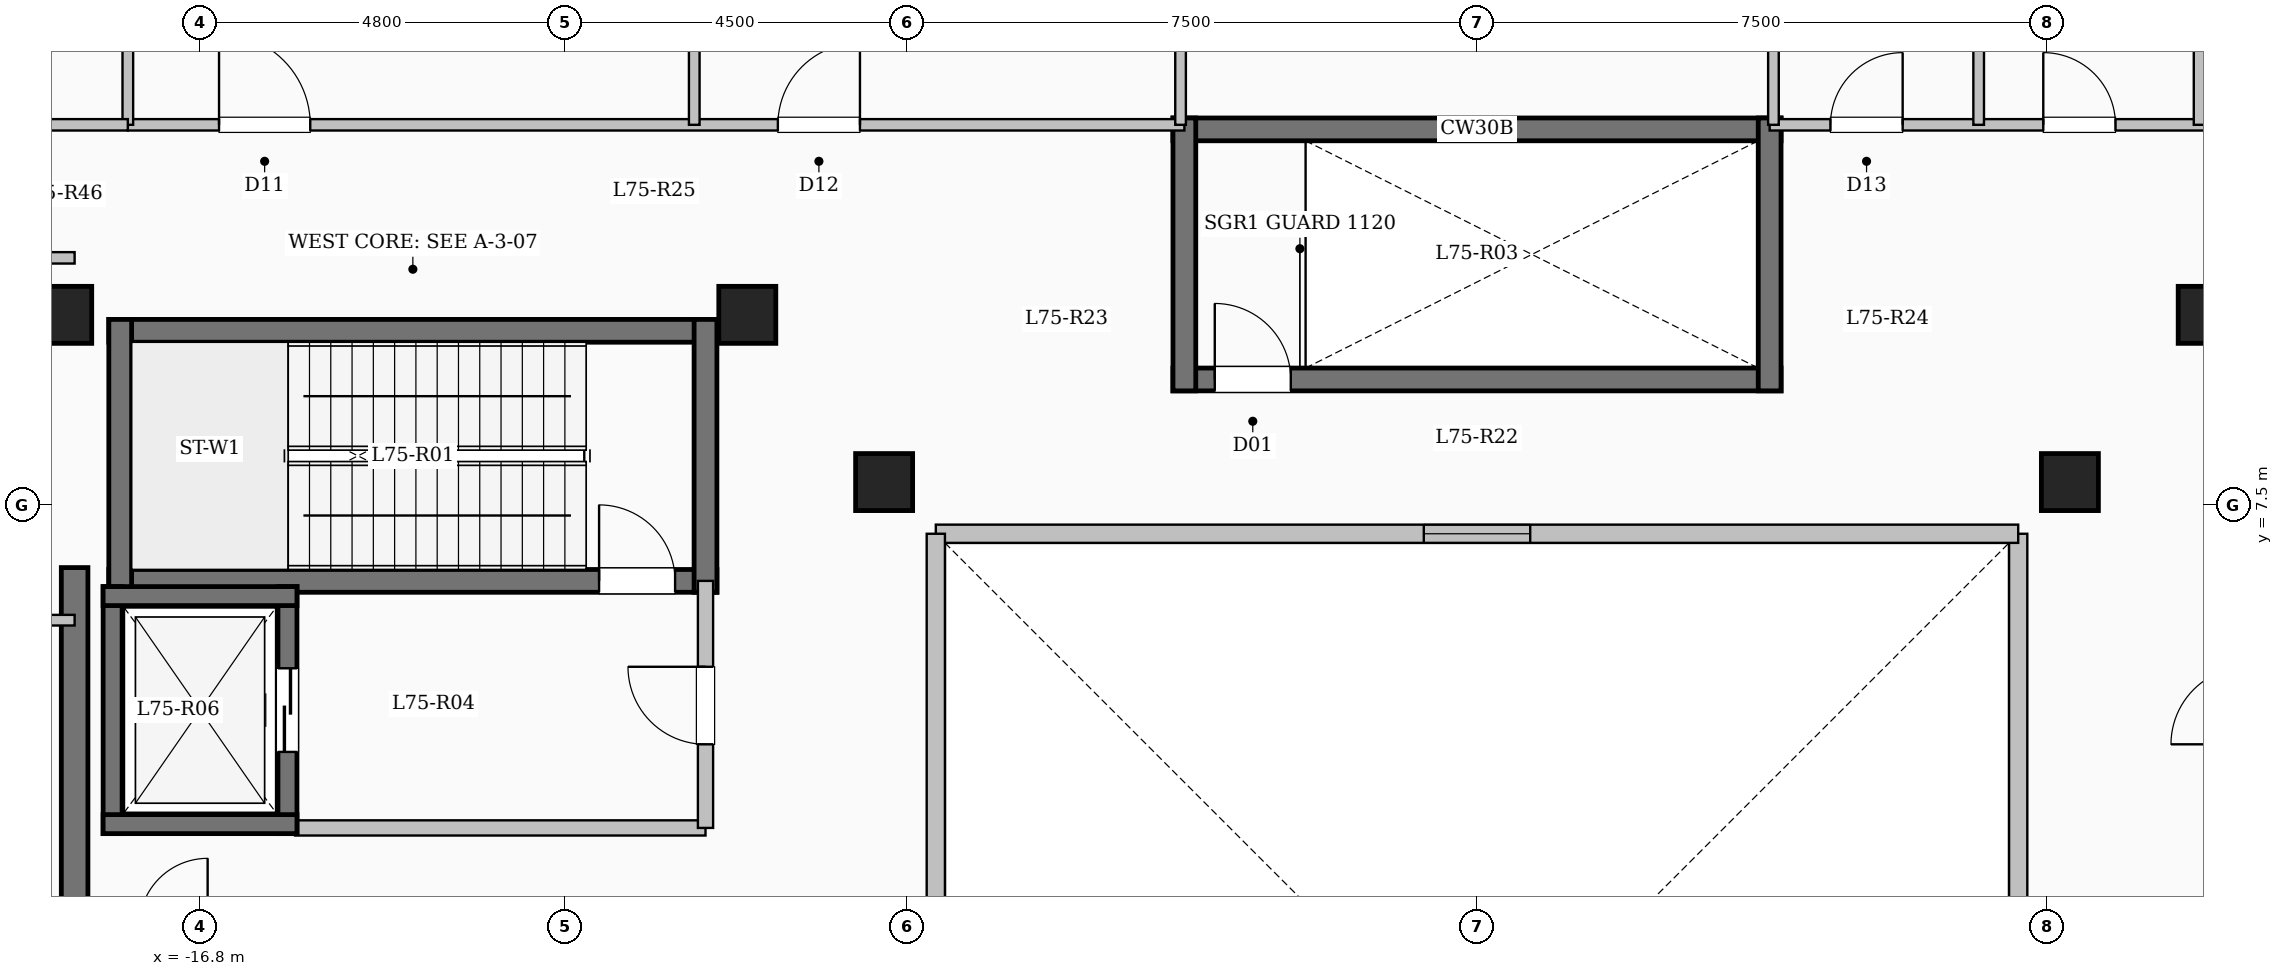
"""IFC4 building model, lengths in metres.
Left out: names, types, materials, properties, quantities, classifications, styles, units other than length and angle.
Written with IfcOpenShell. Run it as: python <this file> out.ifc"""

import sys

from ifc_helpers import new_model, si_unit, direction, frame, frame_2d, origin, origin_2d, place, context, subcontext, project, spatial, rectangle, extrude, element, fill, save


model = new_model("IFC4")
c1 = context("Model", 3, precision=1e-05, world=origin(), true_north=direction((0.0, 1.0)))
c2 = subcontext(c1, "Body", "Model", "MODEL_VIEW")
j1 = project(units=[si_unit("LENGTHUNIT", "METRE"), si_unit("PLANEANGLEUNIT", "RADIAN")], contexts=[c1])
p1 = place(None, origin())
s1 = spatial("IfcSite", under=j1, at=p1, CompositionType="ELEMENT")
p2 = place(p1, origin())
s2 = spatial("IfcBuilding", under=s1, at=p2, CompositionType="ELEMENT")
p3 = place(p2, frame((0.0, 0.0, 276.3)))
s3 = spatial("IfcBuildingStorey", under=s2, at=p3, CompositionType="ELEMENT", Elevation=276.3)
for number, where, z_axis, x_axis in (
    (1, (-7.8, 7.8, 0.0), (0.0, 0.0, 1.0), (1.0, 0.0, 0.0)),
    (2, (7.8, 7.8, 0.0), (0.0, 0.0, 1.0), (1.0, 0.0, 0.0)),
    (3, (-9.6, 10.0, 0.0), (0.0, 0.0, 1.0), (1.0, 0.0, 0.0)),
    (4, (9.6, 10.0, 0.0), (0.0, 0.0, 1.0), (1.0, 0.0, 0.0)),
    (5, (-18.6, 10.0, 0.0), (0.0, 0.0, 1.0), (1.0, 0.0, 0.0)),
):
    element("IfcColumn", number, at=place(p3, frame(where, z_axis=z_axis, x_axis=x_axis)), inside=s3, PredefinedType="COLUMN", context=c2, shape_type="SweptSolid", body=[
        extrude(rectangle(XDim=0.75, YDim=0.75, at=origin_2d()), origin(), (0.0, 0.0, 1.0), 5.25),
    ])
p4 = place(p3, frame((7.12, -7.12, 0.0), z_axis=(0.0, 0.0, 1.0), x_axis=(0.0, 1.0, 0.0)))
e6 = element("IfcWall", 6, at=p4, inside=s3, PredefinedType="SOLIDWALL", context=c2, shape_type="SweptSolid", body=[
    extrude(rectangle(XDim=14.24, YDim=0.24, at=frame_2d((7.12, 0.0))), origin(), (0.0, 0.0, 1.0), 4.95),
])
p5 = place(p4, frame((6.42, 0.0, 0.95)))
e7 = element("IfcOpeningElement", 7, at=p5, cuts=e6, PredefinedType="OPENING", context=c2, shape_type="SweptSolid", body=[
    extrude(rectangle(XDim=1.4, YDim=1.5, at=frame_2d((0.7, 0.75))), frame((0.0, 0.13, 0.0), z_axis=(0.0, -1.0, 0.0), x_axis=(1.0, 0.0, 0.0)), (0.0, 0.0, 1.0), 0.26),
])
p6 = place(p3, frame((7.12, 7.12, 0.0), z_axis=(0.0, 0.0, 1.0), x_axis=(-1.0, 0.0, 0.0)))
e8 = element("IfcWall", 8, at=p6, inside=s3, PredefinedType="SOLIDWALL", context=c2, shape_type="SweptSolid", body=[
    extrude(rectangle(XDim=14.24, YDim=0.24, at=frame_2d((7.12, 0.0))), origin(), (0.0, 0.0, 1.0), 4.95),
])
p7 = place(p6, frame((6.42, 0.0, 0.95)))
e9 = element("IfcOpeningElement", 9, at=p7, cuts=e8, PredefinedType="OPENING", context=c2, shape_type="SweptSolid", body=[
    extrude(rectangle(XDim=1.4, YDim=1.5, at=frame_2d((0.7, 0.75))), frame((0.0, 0.13, 0.0), z_axis=(0.0, -1.0, 0.0), x_axis=(1.0, 0.0, 0.0)), (0.0, 0.0, 1.0), 0.26),
])
p8 = place(p3, frame((-7.12, 7.12, 0.0), z_axis=(0.0, 0.0, 1.0), x_axis=(0.0, -1.0, 0.0)))
e10 = element("IfcWall", 10, at=p8, inside=s3, PredefinedType="SOLIDWALL", context=c2, shape_type="SweptSolid", body=[
    extrude(rectangle(XDim=14.24, YDim=0.24, at=frame_2d((7.12, 0.0))), origin(), (0.0, 0.0, 1.0), 4.95),
])
p9 = place(p8, frame((6.42, 0.0, 0.95)))
e11 = element("IfcOpeningElement", 11, at=p9, cuts=e10, PredefinedType="OPENING", context=c2, shape_type="SweptSolid", body=[
    extrude(rectangle(XDim=1.4, YDim=1.5, at=frame_2d((0.7, 0.75))), frame((0.0, 0.13, 0.0), z_axis=(0.0, -1.0, 0.0), x_axis=(1.0, 0.0, 0.0)), (0.0, 0.0, 1.0), 0.26),
])
p10 = place(p3, frame((-18.0, 9.79, 0.0), z_axis=(0.0, 0.0, 1.0), x_axis=(1.0, 0.0, 0.0)))
e12 = element("IfcWall", 12, at=p10, inside=s3, PredefinedType="SHEAR", context=c2, shape_type="SweptSolid", body=[
    extrude(rectangle(XDim=8.0, YDim=0.3, at=frame_2d((4.0, 0.0))), origin(), (0.0, 0.0, 1.0), 5.25),
])
p11 = place(p3, frame((-18.0, 6.5, 0.0), z_axis=(0.0, 0.0, 1.0), x_axis=(1.0, 0.0, 0.0)))
e13 = element("IfcWall", 13, at=p11, inside=s3, PredefinedType="SHEAR", context=c2, shape_type="SweptSolid", body=[
    extrude(rectangle(XDim=8.0, YDim=0.3, at=frame_2d((4.0, 0.0))), origin(), (0.0, 0.0, 1.0), 5.25),
])
p12 = place(p11, frame((6.45, 0.0, 0.0)))
e14 = element("IfcOpeningElement", 14, at=p12, cuts=e13, PredefinedType="OPENING", context=c2, shape_type="SweptSolid", body=[
    extrude(rectangle(XDim=1.0, YDim=2.15, at=frame_2d((0.5, 1.075))), frame((0.0, 0.16, 0.0), z_axis=(0.0, -1.0, 0.0), x_axis=(1.0, 0.0, 0.0)), (0.0, 0.0, 1.0), 0.32),
])
for number, where, z_axis, x_axis in (
    (15, (-17.85, 6.35, 0.0), (0.0, 0.0, 1.0), (0.0, 1.0, 0.0)),
    (16, (-10.15, 6.35, 0.0), (0.0, 0.0, 1.0), (0.0, 1.0, 0.0)),
):
    element("IfcWall", number, at=place(p3, frame(where, z_axis=z_axis, x_axis=x_axis)), inside=s3, PredefinedType="SHEAR", context=c2, shape_type="SweptSolid", body=[
        extrude(rectangle(XDim=3.59, YDim=0.3, at=frame_2d((1.795, 0.0))), origin(), (0.0, 0.0, 1.0), 5.25),
    ])
p13 = place(p3, frame((-4.0, 12.44, 0.0), z_axis=(0.0, 0.0, 1.0), x_axis=(1.0, 0.0, 0.0)))
e17 = element("IfcWall", 17, at=p13, inside=s3, PredefinedType="SHEAR", context=c2, shape_type="SweptSolid", body=[
    extrude(rectangle(XDim=8.0, YDim=0.3, at=frame_2d((4.0, 0.0))), origin(), (0.0, 0.0, 1.0), 5.25),
])
p14 = place(p3, frame((-4.0, 9.15, 0.0), z_axis=(0.0, 0.0, 1.0), x_axis=(1.0, 0.0, 0.0)))
e18 = element("IfcWall", 18, at=p14, inside=s3, PredefinedType="SHEAR", context=c2, shape_type="SweptSolid", body=[
    extrude(rectangle(XDim=8.0, YDim=0.3, at=frame_2d((4.0, 0.0))), origin(), (0.0, 0.0, 1.0), 5.25),
])
p15 = place(p14, frame((0.55, 0.0, 0.0)))
e19 = element("IfcOpeningElement", 19, at=p15, cuts=e18, PredefinedType="OPENING", context=c2, shape_type="SweptSolid", body=[
    extrude(rectangle(XDim=1.0, YDim=2.15, at=frame_2d((0.5, 1.075))), frame((0.0, 0.16, 0.0), z_axis=(0.0, -1.0, 0.0), x_axis=(1.0, 0.0, 0.0)), (0.0, 0.0, 1.0), 0.32),
])
for number, where, z_axis, x_axis in (
    (20, (-3.85, 9.0, 0.0), (0.0, 0.0, 1.0), (0.0, 1.0, 0.0)),
    (21, (3.85, 9.0, 0.0), (0.0, 0.0, 1.0), (0.0, 1.0, 0.0)),
):
    element("IfcWall", number, at=place(p3, frame(where, z_axis=z_axis, x_axis=x_axis)), inside=s3, PredefinedType="SHEAR", context=c2, shape_type="SweptSolid", body=[
        extrude(rectangle(XDim=3.59, YDim=0.3, at=frame_2d((1.795, 0.0))), origin(), (0.0, 0.0, 1.0), 5.25),
    ])
p16 = place(p3, frame((-15.55, 3.25, 0.0), z_axis=(0.0, 0.0, 1.0), x_axis=(1.0, 0.0, 0.0)))
e22 = element("IfcWall", 22, at=p16, inside=s3, PredefinedType="SOLIDWALL", context=c2, shape_type="SweptSolid", body=[
    extrude(rectangle(XDim=5.4, YDim=0.2, at=frame_2d((2.7, 0.0))), origin(), (0.0, 0.0, 1.0), 4.95),
])
p17 = place(p3, frame((-10.15, 3.25, 0.0), z_axis=(0.0, 0.0, 1.0), x_axis=(0.0, 1.0, 0.0)))
e23 = element("IfcWall", 23, at=p17, inside=s3, PredefinedType="SOLIDWALL", context=c2, shape_type="SweptSolid", body=[
    extrude(rectangle(XDim=3.25, YDim=0.2, at=frame_2d((1.625, 0.0))), origin(), (0.0, 0.0, 1.0), 4.95),
])
p18 = place(p17, frame((1.1, 0.0, 0.0)))
e24 = element("IfcOpeningElement", 24, at=p18, cuts=e23, PredefinedType="OPENING", context=c2, shape_type="SweptSolid", body=[
    extrude(rectangle(XDim=1.02, YDim=2.15, at=frame_2d((0.51, 1.075))), frame((0.0, 0.11, 0.0), z_axis=(0.0, -1.0, 0.0), x_axis=(1.0, 0.0, 0.0)), (0.0, 0.0, 1.0), 0.22),
])
p19 = place(p3, frame((-17.95, 3.175, 0.0), z_axis=(0.0, 0.0, 1.0), x_axis=(0.0, 1.0, 0.0)))
e25 = element("IfcWall", 25, at=p19, inside=s3, PredefinedType="SHEAR", context=c2, shape_type="SweptSolid", body=[
    extrude(rectangle(XDim=3.25, YDim=0.25, at=frame_2d((1.625, 0.0))), origin(), (0.0, 0.0, 1.0), 5.25),
])
p20 = place(p3, frame((-15.65, 3.175, 0.0), z_axis=(0.0, 0.0, 1.0), x_axis=(0.0, 1.0, 0.0)))
e26 = element("IfcWall", 26, at=p20, inside=s3, PredefinedType="SHEAR", context=c2, shape_type="SweptSolid", body=[
    extrude(rectangle(XDim=3.25, YDim=0.25, at=frame_2d((1.625, 0.0))), origin(), (0.0, 0.0, 1.0), 5.25),
])
p21 = place(p20, frame((1.075, 0.0, 0.0)))
e27 = element("IfcOpeningElement", 27, at=p21, cuts=e26, PredefinedType="OPENING", context=c2, shape_type="SweptSolid", body=[
    extrude(rectangle(XDim=1.1, YDim=2.15, at=frame_2d((0.55, 1.075))), frame((0.0, 0.135, 0.0), z_axis=(0.0, -1.0, 0.0), x_axis=(1.0, 0.0, 0.0)), (0.0, 0.0, 1.0), 0.27),
])
for number, where, z_axis, x_axis in (
    (28, (-18.075, 3.3, 0.0), (0.0, 0.0, 1.0), (1.0, 0.0, 0.0)),
    (29, (-18.075, 6.3, 0.0), (0.0, 0.0, 1.0), (1.0, 0.0, 0.0)),
):
    element("IfcWall", number, at=place(p3, frame(where, z_axis=z_axis, x_axis=x_axis)), inside=s3, PredefinedType="SHEAR", context=c2, shape_type="SweptSolid", body=[
        extrude(rectangle(XDim=2.55, YDim=0.25, at=frame_2d((1.275, 0.0))), origin(), (0.0, 0.0, 1.0), 5.25),
    ])
p22 = place(p3, frame((-18.45, -7.375, 0.0), z_axis=(0.0, 0.0, 1.0), x_axis=(0.0, 1.0, 0.0)))
e30 = element("IfcWall", 30, at=p22, inside=s3, PredefinedType="SHEAR", context=c2, shape_type="SweptSolid", body=[
    extrude(rectangle(XDim=14.05, YDim=0.35, at=frame_2d((7.025, 0.0))), origin(), (0.0, 0.0, 1.0), 5.25),
])
p23 = place(p3, frame((-17.75, 12.5, 0.0), z_axis=(0.0, 0.0, 1.0), x_axis=(1.0, 0.0, 0.0)))
e31 = element("IfcWall", 31, at=p23, inside=s3, PredefinedType="PARTITIONING", context=c2, shape_type="SweptSolid", body=[
    extrude(rectangle(XDim=13.9, YDim=0.15, at=frame_2d((6.95, 0.0))), origin(), (0.0, 0.0, 1.0), 4.95),
])
p24 = place(p23, frame((1.2, 0.0, 0.0)))
e32 = element("IfcOpeningElement", 32, at=p24, cuts=e31, PredefinedType="OPENING", context=c2, shape_type="SweptSolid", body=[
    extrude(rectangle(XDim=1.2, YDim=2.15, at=frame_2d((0.6, 1.075))), frame((0.0, 0.085, 0.0), z_axis=(0.0, -1.0, 0.0), x_axis=(1.0, 0.0, 0.0)), (0.0, 0.0, 1.0), 0.17),
])
p25 = place(p23, frame((8.552, 0.0, 0.0)))
e33 = element("IfcOpeningElement", 33, at=p25, cuts=e31, PredefinedType="OPENING", context=c2, shape_type="SweptSolid", body=[
    extrude(rectangle(XDim=1.08, YDim=2.15, at=frame_2d((0.54, 1.075))), frame((0.0, 0.085, 0.0), z_axis=(0.0, -1.0, 0.0), x_axis=(1.0, 0.0, 0.0)), (0.0, 0.0, 1.0), 0.17),
])
p26 = place(p3, frame((3.85, 12.5, 0.0), z_axis=(0.0, 0.0, 1.0), x_axis=(1.0, 0.0, 0.0)))
e34 = element("IfcWall", 34, at=p26, inside=s3, PredefinedType="PARTITIONING", context=c2, shape_type="SweptSolid", body=[
    extrude(rectangle(XDim=13.9, YDim=0.15, at=frame_2d((6.95, 0.0))), origin(), (0.0, 0.0, 1.0), 4.95),
])
p27 = place(p26, frame((0.8, 0.0, 0.0)))
e35 = element("IfcOpeningElement", 35, at=p27, cuts=e34, PredefinedType="OPENING", context=c2, shape_type="SweptSolid", body=[
    extrude(rectangle(XDim=0.95, YDim=2.15, at=frame_2d((0.475, 1.075))), frame((0.0, 0.085, 0.0), z_axis=(0.0, -1.0, 0.0), x_axis=(1.0, 0.0, 0.0)), (0.0, 0.0, 1.0), 0.17),
])
p28 = place(p26, frame((3.6, 0.0, 0.0)))
e36 = element("IfcOpeningElement", 36, at=p28, cuts=e34, PredefinedType="OPENING", context=c2, shape_type="SweptSolid", body=[
    extrude(rectangle(XDim=0.95, YDim=2.15, at=frame_2d((0.475, 1.075))), frame((0.0, 0.085, 0.0), z_axis=(0.0, -1.0, 0.0), x_axis=(1.0, 0.0, 0.0)), (0.0, 0.0, 1.0), 0.17),
])
p29 = place(p26, frame((6.55, 0.0, 0.0)))
e37 = element("IfcOpeningElement", 37, at=p29, cuts=e34, PredefinedType="OPENING", context=c2, shape_type="SweptSolid", body=[
    extrude(rectangle(XDim=1.08, YDim=2.15, at=frame_2d((0.54, 1.075))), frame((0.0, 0.085, 0.0), z_axis=(0.0, -1.0, 0.0), x_axis=(1.0, 0.0, 0.0)), (0.0, 0.0, 1.0), 0.17),
])
p30 = place(p26, frame((9.637, 0.0, 0.0)))
e38 = element("IfcOpeningElement", 38, at=p30, cuts=e34, PredefinedType="OPENING", context=c2, shape_type="SweptSolid", body=[
    extrude(rectangle(XDim=1.2, YDim=2.15, at=frame_2d((0.6, 1.075))), frame((0.0, 0.085, 0.0), z_axis=(0.0, -1.0, 0.0), x_axis=(1.0, 0.0, 0.0)), (0.0, 0.0, 1.0), 0.17),
])
p31 = place(p3, frame((-3.9, 12.5, 0.0), z_axis=(0.0, 0.0, 1.0), x_axis=(0.0, 1.0, 0.0)))
e39 = element("IfcWall", 39, at=p31, inside=s3, PredefinedType="PARTITIONING", context=c2, shape_type="SweptSolid", body=[
    extrude(rectangle(XDim=9.88, YDim=0.14, at=frame_2d((4.94, 0.0))), origin(), (0.0, 0.0, 1.0), 4.95),
])
p32 = place(p31, frame((1.1, 0.0, 0.0)))
e40 = element("IfcOpeningElement", 40, at=p32, cuts=e39, PredefinedType="OPENING", context=c2, shape_type="SweptSolid", body=[
    extrude(rectangle(XDim=1.08, YDim=2.15, at=frame_2d((0.54, 1.075))), frame((0.0, 0.08, 0.0), z_axis=(0.0, -1.0, 0.0), x_axis=(1.0, 0.0, 0.0)), (0.0, 0.0, 1.0), 0.16),
])
p33 = place(p3, frame((3.9, 12.5, 0.0), z_axis=(0.0, 0.0, 1.0), x_axis=(0.0, 1.0, 0.0)))
e41 = element("IfcWall", 41, at=p33, inside=s3, PredefinedType="PARTITIONING", context=c2, shape_type="SweptSolid", body=[
    extrude(rectangle(XDim=9.88, YDim=0.14, at=frame_2d((4.94, 0.0))), origin(), (0.0, 0.0, 1.0), 4.95),
])
p34 = place(p3, frame((-10.298, 12.5, 0.0), z_axis=(0.0, 0.0, 1.0), x_axis=(0.0, 1.0, 0.0)))
e42 = element("IfcWall", 42, at=p34, inside=s3, PredefinedType="PARTITIONING", context=c2, shape_type="SweptSolid", body=[
    extrude(rectangle(XDim=8.573, YDim=0.14, at=frame_2d((4.287, 0.0))), origin(), (0.0, 0.0, 1.0), 4.95),
])
p35 = place(p3, frame((6.6, 12.5, 0.0), z_axis=(0.0, 0.0, 1.0), x_axis=(0.0, 1.0, 0.0)))
e43 = element("IfcWall", 43, at=p35, inside=s3, PredefinedType="PARTITIONING", context=c2, shape_type="SweptSolid", body=[
    extrude(rectangle(XDim=9.485, YDim=0.14, at=frame_2d((4.743, 0.0))), origin(), (0.0, 0.0, 1.0), 4.95),
])
p36 = place(p3, frame((9.5, 12.5, 0.0), z_axis=(0.0, 0.0, 1.0), x_axis=(0.0, 1.0, 0.0)))
e44 = element("IfcWall", 44, at=p36, inside=s3, PredefinedType="PARTITIONING", context=c2, shape_type="SweptSolid", body=[
    extrude(rectangle(XDim=8.77, YDim=0.14, at=frame_2d((4.385, 0.0))), origin(), (0.0, 0.0, 1.0), 4.95),
])
p37 = place(p3, frame((-22.68, 10.75, 0.0), z_axis=(0.0, 0.0, 1.0), x_axis=(1.0, 0.0, 0.0)))
e45 = element("IfcWall", 45, at=p37, inside=s3, PredefinedType="PARTITIONING", context=c2, shape_type="SweptSolid", body=[
    extrude(rectangle(XDim=4.23, YDim=0.15, at=frame_2d((2.115, 0.0))), origin(), (0.0, 0.0, 1.0), 4.95),
])
p38 = place(p3, frame((-17.75, 12.5, 0.0), z_axis=(0.0, 0.0, 1.0), x_axis=(0.0, 1.0, 0.0)))
e46 = element("IfcWall", 46, at=p38, inside=s3, PredefinedType="PARTITIONING", context=c2, shape_type="SweptSolid", body=[
    extrude(rectangle(XDim=5.05, YDim=0.14, at=frame_2d((2.525, 0.0))), origin(), (0.0, 0.0, 1.0), 4.95),
])
p39 = place(p3, frame((-22.68, 12.5, 0.0), z_axis=(0.0, 0.0, 1.0), x_axis=(1.0, 0.0, 0.0)))
e47 = element("IfcWall", 47, at=p39, inside=s3, PredefinedType="PARTITIONING", context=c2, shape_type="SweptSolid", body=[
    extrude(rectangle(XDim=4.93, YDim=0.15, at=frame_2d((2.465, 0.0))), origin(), (0.0, 0.0, 1.0), 4.95),
])
p40 = place(p39, frame((1.99, 0.0, 0.0)))
e48 = element("IfcOpeningElement", 48, at=p40, cuts=e47, PredefinedType="OPENING", context=c2, shape_type="SweptSolid", body=[
    extrude(rectangle(XDim=0.95, YDim=2.15, at=frame_2d((0.475, 1.075))), frame((0.0, 0.085, 0.0), z_axis=(0.0, -1.0, 0.0), x_axis=(1.0, 0.0, 0.0)), (0.0, 0.0, 1.0), 0.17),
])
p41 = place(p3, frame((-22.68, 5.983, 0.0), z_axis=(0.0, 0.0, 1.0), x_axis=(1.0, 0.0, 0.0)))
e49 = element("IfcWall", 49, at=p41, inside=s3, PredefinedType="PARTITIONING", context=c2, shape_type="SweptSolid", body=[
    extrude(rectangle(XDim=4.23, YDim=0.14, at=frame_2d((2.115, 0.0))), origin(), (0.0, 0.0, 1.0), 4.535),
])
p42 = place(p41, frame((2.38, 0.0, 0.0)))
e50 = element("IfcOpeningElement", 50, at=p42, cuts=e49, PredefinedType="OPENING", context=c2, shape_type="SweptSolid", body=[
    extrude(rectangle(XDim=1.08, YDim=2.15, at=frame_2d((0.54, 1.075))), frame((0.0, 0.08, 0.0), z_axis=(0.0, -1.0, 0.0), x_axis=(1.0, 0.0, 0.0)), (0.0, 0.0, 1.0), 0.16),
])
p43 = place(p7, origin())
e51 = element("IfcWindow", 51, at=p43, inside=s3, PartitioningType="SINGLE_PANEL", PredefinedType="WINDOW", context=c2, shape_type="SweptSolid", body=[
    extrude(rectangle(XDim=1.4, YDim=1.5, at=frame_2d((0.7, 0.75))), frame((0.0, 0.03, 0.0), z_axis=(0.0, -1.0, 0.0), x_axis=(1.0, 0.0, 0.0)), (0.0, 0.0, 1.0), 0.06),
])
fill(e9, e51)
p44 = place(p12, origin())
e52 = element("IfcDoor", 52, at=p44, inside=s3, OperationType="SINGLE_SWING_LEFT", PredefinedType="DOOR", context=c2, shape_type="SweptSolid", body=[
    extrude(rectangle(XDim=1.0, YDim=2.15, at=frame_2d((0.5, 1.075))), frame((0.0, 0.025, 0.0), z_axis=(0.0, -1.0, 0.0), x_axis=(1.0, 0.0, 0.0)), (0.0, 0.0, 1.0), 0.05),
])
fill(e14, e52)
p45 = place(p15, origin())
e53 = element("IfcDoor", 53, at=p45, inside=s3, OperationType="SINGLE_SWING_LEFT", PredefinedType="DOOR", context=c2, shape_type="SweptSolid", body=[
    extrude(rectangle(XDim=1.0, YDim=2.15, at=frame_2d((0.5, 1.075))), frame((0.0, 0.025, 0.0), z_axis=(0.0, -1.0, 0.0), x_axis=(1.0, 0.0, 0.0)), (0.0, 0.0, 1.0), 0.05),
])
fill(e19, e53)
p46 = place(p18, origin())
e54 = element("IfcDoor", 54, at=p46, inside=s3, OperationType="SINGLE_SWING_RIGHT", PredefinedType="DOOR", context=c2, shape_type="SweptSolid", body=[
    extrude(rectangle(XDim=1.02, YDim=2.15, at=frame_2d((0.51, 1.075))), frame((0.0, 0.025, 0.0), z_axis=(0.0, -1.0, 0.0), x_axis=(1.0, 0.0, 0.0)), (0.0, 0.0, 1.0), 0.05),
])
fill(e24, e54)
p47 = place(p21, origin())
e55 = element("IfcDoor", 55, at=p47, inside=s3, OperationType="SLIDING_TO_LEFT", PredefinedType="DOOR", context=c2, shape_type="SweptSolid", body=[
    extrude(rectangle(XDim=1.1, YDim=2.15, at=frame_2d((0.55, 1.075))), frame((0.0, 0.025, 0.0), z_axis=(0.0, -1.0, 0.0), x_axis=(1.0, 0.0, 0.0)), (0.0, 0.0, 1.0), 0.05),
])
fill(e27, e55)
p48 = place(p24, origin())
e56 = element("IfcDoor", 56, at=p48, inside=s3, OperationType="SINGLE_SWING_LEFT", PredefinedType="DOOR", context=c2, shape_type="SweptSolid", body=[
    extrude(rectangle(XDim=1.2, YDim=2.15, at=frame_2d((0.6, 1.075))), frame((0.0, 0.025, 0.0), z_axis=(0.0, -1.0, 0.0), x_axis=(1.0, 0.0, 0.0)), (0.0, 0.0, 1.0), 0.05),
])
fill(e32, e56)
p49 = place(p25, origin())
e57 = element("IfcDoor", 57, at=p49, inside=s3, OperationType="SINGLE_SWING_RIGHT", PredefinedType="DOOR", context=c2, shape_type="SweptSolid", body=[
    extrude(rectangle(XDim=1.08, YDim=2.15, at=frame_2d((0.54, 1.075))), frame((0.0, 0.025, 0.0), z_axis=(0.0, -1.0, 0.0), x_axis=(1.0, 0.0, 0.0)), (0.0, 0.0, 1.0), 0.05),
])
fill(e33, e57)
p50 = place(p27, origin())
e58 = element("IfcDoor", 58, at=p50, inside=s3, OperationType="SINGLE_SWING_RIGHT", PredefinedType="DOOR", context=c2, shape_type="SweptSolid", body=[
    extrude(rectangle(XDim=0.95, YDim=2.15, at=frame_2d((0.475, 1.075))), frame((0.0, 0.025, 0.0), z_axis=(0.0, -1.0, 0.0), x_axis=(1.0, 0.0, 0.0)), (0.0, 0.0, 1.0), 0.05),
])
fill(e35, e58)
p51 = place(p28, origin())
e59 = element("IfcDoor", 59, at=p51, inside=s3, OperationType="SINGLE_SWING_LEFT", PredefinedType="DOOR", context=c2, shape_type="SweptSolid", body=[
    extrude(rectangle(XDim=0.95, YDim=2.15, at=frame_2d((0.475, 1.075))), frame((0.0, 0.025, 0.0), z_axis=(0.0, -1.0, 0.0), x_axis=(1.0, 0.0, 0.0)), (0.0, 0.0, 1.0), 0.05),
])
fill(e36, e59)
save(model, sys.argv[1])
